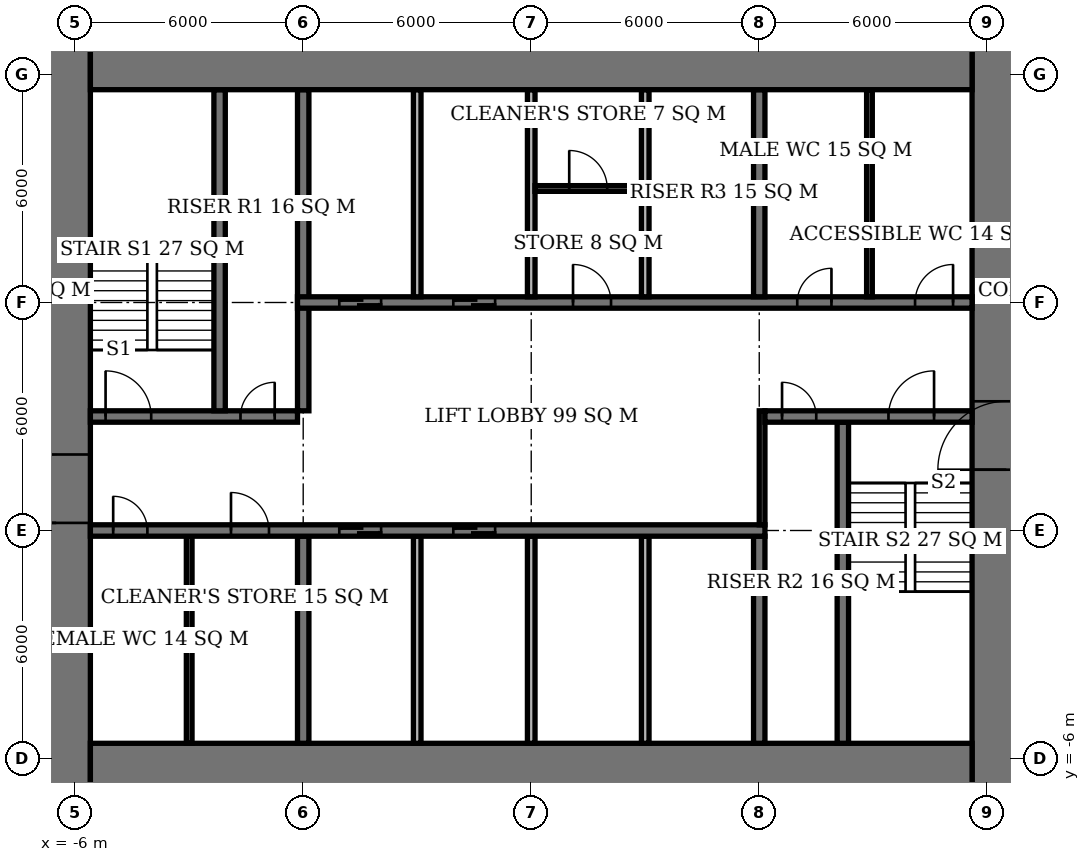
"""IFC4 building model, lengths in metres.
Left out: names, types, materials, properties, quantities, classifications, styles, units other than length and angle.
Written with IfcOpenShell. Run it as: python <this file> out.ifc"""

import sys

from ifc_helpers import new_model, si_unit, direction, frame, frame_2d, origin, place, context, subcontext, project, spatial, rectangle, extrude, element, fill, save


model = new_model("IFC4")
c1 = context("Model", 3, precision=1e-05, world=origin(), true_north=direction((0.0, 1.0)))
c2 = subcontext(c1, "Body", "Model", "MODEL_VIEW")
j1 = project(units=[si_unit("LENGTHUNIT", "METRE"), si_unit("PLANEANGLEUNIT", "RADIAN")], contexts=[c1])
p1 = place(None, origin())
s1 = spatial("IfcSite", under=j1, at=p1, CompositionType="ELEMENT")
p2 = place(p1, origin())
s2 = spatial("IfcBuilding", under=s1, at=p2, CompositionType="ELEMENT")
p3 = place(p2, frame((0.0, 0.0, 132.8)))
s3 = spatial("IfcBuildingStorey", under=s2, at=p3, CompositionType="ELEMENT", Elevation=132.8)
for number, where, z_axis, x_axis in (
    (1, (-5.6, -6.6, 0.0), (0.0, 0.0, 1.0), (1.0, 0.0, 0.0)),
    (2, (-5.6, 12.6, 0.0), (0.0, 0.0, 1.0), (1.0, 0.0, 0.0)),
):
    element("IfcWall", number, at=place(p3, frame(where, z_axis=z_axis, x_axis=x_axis)), inside=s3, PredefinedType="SHEAR", context=c2, shape_type="SweptSolid", body=[
        extrude(rectangle(XDim=23.2, YDim=2.0, at=frame_2d((11.6, 0.0))), origin(), (0.0, 0.0, 1.0), 3.9),
    ])
p4 = place(p3, frame((-6.5, -7.6, 0.0), z_axis=(0.0, 0.0, 1.0), x_axis=(0.0, 1.0, 0.0)))
e3 = element("IfcWall", 3, at=p4, inside=s3, PredefinedType="SHEAR", context=c2, shape_type="SweptSolid", body=[
    extrude(rectangle(XDim=21.2, YDim=1.8, at=frame_2d((10.6, 0.0))), origin(), (0.0, 0.0, 1.0), 3.9),
])
p5 = place(p4, frame((7.8, 0.0, 0.0)))
e4 = element("IfcOpeningElement", 4, at=p5, cuts=e3, PredefinedType="OPENING", context=c2, shape_type="SweptSolid", body=[
    extrude(rectangle(XDim=1.8, YDim=2.4, at=frame_2d((0.9, 1.2))), frame((0.0, 0.91, 0.0), z_axis=(0.0, -1.0, 0.0), x_axis=(1.0, 0.0, 0.0)), (0.0, 0.0, 1.0), 1.82),
])
p6 = place(p3, frame((18.5, -7.6, 0.0), z_axis=(0.0, 0.0, 1.0), x_axis=(0.0, 1.0, 0.0)))
e5 = element("IfcWall", 5, at=p6, inside=s3, PredefinedType="SHEAR", context=c2, shape_type="SweptSolid", body=[
    extrude(rectangle(XDim=21.2, YDim=1.8, at=frame_2d((10.6, 0.0))), origin(), (0.0, 0.0, 1.0), 3.9),
])
p7 = place(p6, frame((9.2, 0.0, 0.0)))
e6 = element("IfcOpeningElement", 6, at=p7, cuts=e5, PredefinedType="OPENING", context=c2, shape_type="SweptSolid", body=[
    extrude(rectangle(XDim=1.8, YDim=2.4, at=frame_2d((0.9, 1.2))), frame((0.0, 0.91, 0.0), z_axis=(0.0, -1.0, 0.0), x_axis=(1.0, 0.0, 0.0)), (0.0, 0.0, 1.0), 1.82),
])
p8 = place(p3, frame((-5.6, 0.0, 0.0), z_axis=(0.0, 0.0, 1.0), x_axis=(1.0, 0.0, 0.0)))
e7 = element("IfcWall", 7, at=p8, inside=s3, PredefinedType="SHEAR", context=c2, shape_type="SweptSolid", body=[
    extrude(rectangle(XDim=17.75, YDim=0.3, at=frame_2d((8.875, 0.0))), origin(), (0.0, 0.0, 1.0), 3.9),
])
p9 = place(p8, frame((0.6, 0.0, 0.0)))
e8 = element("IfcOpeningElement", 8, at=p9, cuts=e7, PredefinedType="OPENING", context=c2, shape_type="SweptSolid", body=[
    extrude(rectangle(XDim=0.9, YDim=2.1, at=frame_2d((0.45, 1.05))), frame((0.0, 0.16, 0.0), z_axis=(0.0, -1.0, 0.0), x_axis=(1.0, 0.0, 0.0)), (0.0, 0.0, 1.0), 0.32),
])
p10 = place(p8, frame((3.7, 0.0, 0.0)))
e9 = element("IfcOpeningElement", 9, at=p10, cuts=e7, PredefinedType="OPENING", context=c2, shape_type="SweptSolid", body=[
    extrude(rectangle(XDim=1.0, YDim=2.1, at=frame_2d((0.5, 1.05))), frame((0.0, 0.16, 0.0), z_axis=(0.0, -1.0, 0.0), x_axis=(1.0, 0.0, 0.0)), (0.0, 0.0, 1.0), 0.32),
])
p11 = place(p8, frame((6.55, 0.0, 0.0)))
e10 = element("IfcOpeningElement", 10, at=p11, cuts=e7, PredefinedType="OPENING", context=c2, shape_type="SweptSolid", body=[
    extrude(rectangle(XDim=1.1, YDim=2.1, at=frame_2d((0.55, 1.05))), frame((0.0, 0.16, 0.0), z_axis=(0.0, -1.0, 0.0), x_axis=(1.0, 0.0, 0.0)), (0.0, 0.0, 1.0), 0.32),
])
p12 = place(p8, frame((9.55, 0.0, 0.0)))
e11 = element("IfcOpeningElement", 11, at=p12, cuts=e7, PredefinedType="OPENING", context=c2, shape_type="SweptSolid", body=[
    extrude(rectangle(XDim=1.1, YDim=2.1, at=frame_2d((0.55, 1.05))), frame((0.0, 0.16, 0.0), z_axis=(0.0, -1.0, 0.0), x_axis=(1.0, 0.0, 0.0)), (0.0, 0.0, 1.0), 0.32),
])
p13 = place(p3, frame((-5.6, 3.0, 0.0), z_axis=(0.0, 0.0, 1.0), x_axis=(1.0, 0.0, 0.0)))
e12 = element("IfcWall", 12, at=p13, inside=s3, PredefinedType="SHEAR", context=c2, shape_type="SweptSolid", body=[
    extrude(rectangle(XDim=5.45, YDim=0.3, at=frame_2d((2.725, 0.0))), origin(), (0.0, 0.0, 1.0), 3.9),
])
p14 = place(p13, frame((0.4, 0.0, 0.0)))
e13 = element("IfcOpeningElement", 13, at=p14, cuts=e12, PredefinedType="OPENING", context=c2, shape_type="SweptSolid", body=[
    extrude(rectangle(XDim=1.2, YDim=2.1, at=frame_2d((0.6, 1.05))), frame((0.0, 0.16, 0.0), z_axis=(0.0, -1.0, 0.0), x_axis=(1.0, 0.0, 0.0)), (0.0, 0.0, 1.0), 0.32),
])
p15 = place(p13, frame((3.95, 0.0, 0.0)))
e14 = element("IfcOpeningElement", 14, at=p15, cuts=e12, PredefinedType="OPENING", context=c2, shape_type="SweptSolid", body=[
    extrude(rectangle(XDim=0.9, YDim=2.1, at=frame_2d((0.45, 1.05))), frame((0.0, 0.16, 0.0), z_axis=(0.0, -1.0, 0.0), x_axis=(1.0, 0.0, 0.0)), (0.0, 0.0, 1.0), 0.32),
])
p16 = place(p3, frame((12.15, 3.0, 0.0), z_axis=(0.0, 0.0, 1.0), x_axis=(1.0, 0.0, 0.0)))
e15 = element("IfcWall", 15, at=p16, inside=s3, PredefinedType="SHEAR", context=c2, shape_type="SweptSolid", body=[
    extrude(rectangle(XDim=5.45, YDim=0.3, at=frame_2d((2.725, 0.0))), origin(), (0.0, 0.0, 1.0), 3.9),
])
p17 = place(p16, frame((3.25, 0.0, 0.0)))
e16 = element("IfcOpeningElement", 16, at=p17, cuts=e15, PredefinedType="OPENING", context=c2, shape_type="SweptSolid", body=[
    extrude(rectangle(XDim=1.2, YDim=2.1, at=frame_2d((0.6, 1.05))), frame((0.0, 0.16, 0.0), z_axis=(0.0, -1.0, 0.0), x_axis=(1.0, 0.0, 0.0)), (0.0, 0.0, 1.0), 0.32),
])
p18 = place(p16, frame((0.45, 0.0, 0.0)))
e17 = element("IfcOpeningElement", 17, at=p18, cuts=e15, PredefinedType="OPENING", context=c2, shape_type="SweptSolid", body=[
    extrude(rectangle(XDim=0.9, YDim=2.1, at=frame_2d((0.45, 1.05))), frame((0.0, 0.16, 0.0), z_axis=(0.0, -1.0, 0.0), x_axis=(1.0, 0.0, 0.0)), (0.0, 0.0, 1.0), 0.32),
])
p19 = place(p3, frame((-0.15, 6.0, 0.0), z_axis=(0.0, 0.0, 1.0), x_axis=(1.0, 0.0, 0.0)))
e18 = element("IfcWall", 18, at=p19, inside=s3, PredefinedType="SHEAR", context=c2, shape_type="SweptSolid", body=[
    extrude(rectangle(XDim=17.75, YDim=0.3, at=frame_2d((8.875, 0.0))), origin(), (0.0, 0.0, 1.0), 3.9),
])
p20 = place(p19, frame((13.15, 0.0, 0.0)))
e19 = element("IfcOpeningElement", 19, at=p20, cuts=e18, PredefinedType="OPENING", context=c2, shape_type="SweptSolid", body=[
    extrude(rectangle(XDim=0.9, YDim=2.1, at=frame_2d((0.45, 1.05))), frame((0.0, 0.16, 0.0), z_axis=(0.0, -1.0, 0.0), x_axis=(1.0, 0.0, 0.0)), (0.0, 0.0, 1.0), 0.32),
])
p21 = place(p19, frame((16.25, 0.0, 0.0)))
e20 = element("IfcOpeningElement", 20, at=p21, cuts=e18, PredefinedType="OPENING", context=c2, shape_type="SweptSolid", body=[
    extrude(rectangle(XDim=1.0, YDim=2.1, at=frame_2d((0.5, 1.05))), frame((0.0, 0.16, 0.0), z_axis=(0.0, -1.0, 0.0), x_axis=(1.0, 0.0, 0.0)), (0.0, 0.0, 1.0), 0.32),
])
p22 = place(p19, frame((7.25, 0.0, 0.0)))
e21 = element("IfcOpeningElement", 21, at=p22, cuts=e18, PredefinedType="OPENING", context=c2, shape_type="SweptSolid", body=[
    extrude(rectangle(XDim=1.0, YDim=2.1, at=frame_2d((0.5, 1.05))), frame((0.0, 0.16, 0.0), z_axis=(0.0, -1.0, 0.0), x_axis=(1.0, 0.0, 0.0)), (0.0, 0.0, 1.0), 0.32),
])
p23 = place(p19, frame((1.1, 0.0, 0.0)))
e22 = element("IfcOpeningElement", 22, at=p23, cuts=e18, PredefinedType="OPENING", context=c2, shape_type="SweptSolid", body=[
    extrude(rectangle(XDim=1.1, YDim=2.1, at=frame_2d((0.55, 1.05))), frame((0.0, 0.16, 0.0), z_axis=(0.0, -1.0, 0.0), x_axis=(1.0, 0.0, 0.0)), (0.0, 0.0, 1.0), 0.32),
])
p24 = place(p19, frame((4.1, 0.0, 0.0)))
e23 = element("IfcOpeningElement", 23, at=p24, cuts=e18, PredefinedType="OPENING", context=c2, shape_type="SweptSolid", body=[
    extrude(rectangle(XDim=1.1, YDim=2.1, at=frame_2d((0.55, 1.05))), frame((0.0, 0.16, 0.0), z_axis=(0.0, -1.0, 0.0), x_axis=(1.0, 0.0, 0.0)), (0.0, 0.0, 1.0), 0.32),
])
p25 = place(p3, frame((0.0, -5.6, 0.0), z_axis=(0.0, 0.0, 1.0), x_axis=(0.0, 1.0, 0.0)))
e24 = element("IfcWall", 24, at=p25, inside=s3, PredefinedType="SHEAR", context=c2, shape_type="SweptSolid", body=[
    extrude(rectangle(XDim=5.45, YDim=0.3, at=frame_2d((2.725, 0.0))), origin(), (0.0, 0.0, 1.0), 3.9),
])
p26 = place(p3, frame((0.0, 3.15, 0.0), z_axis=(0.0, 0.0, 1.0), x_axis=(0.0, 1.0, 0.0)))
e25 = element("IfcWall", 25, at=p26, inside=s3, PredefinedType="SHEAR", context=c2, shape_type="SweptSolid", body=[
    extrude(rectangle(XDim=8.45, YDim=0.3, at=frame_2d((4.225, 0.0))), origin(), (0.0, 0.0, 1.0), 3.9),
])
for number, where, z_axis, x_axis in (
    (26, (12.0, -5.6, 0.0), (0.0, 0.0, 1.0), (0.0, 1.0, 0.0)),
    (27, (12.0, 6.15, 0.0), (0.0, 0.0, 1.0), (0.0, 1.0, 0.0)),
):
    element("IfcWall", number, at=place(p3, frame(where, z_axis=z_axis, x_axis=x_axis)), inside=s3, PredefinedType="SHEAR", context=c2, shape_type="SweptSolid", body=[
        extrude(rectangle(XDim=5.45, YDim=0.3, at=frame_2d((2.725, 0.0))), origin(), (0.0, 0.0, 1.0), 3.9),
    ])
for number, where, z_axis, x_axis in (
    (28, (-2.2, 3.15, 0.0), (0.0, 0.0, 1.0), (0.0, 1.0, 0.0)),
    (29, (14.2, -5.6, 0.0), (0.0, 0.0, 1.0), (0.0, 1.0, 0.0)),
):
    element("IfcWall", number, at=place(p3, frame(where, z_axis=z_axis, x_axis=x_axis)), inside=s3, PredefinedType="SHEAR", context=c2, shape_type="SweptSolid", body=[
        extrude(rectangle(XDim=8.45, YDim=0.3, at=frame_2d((4.225, 0.0))), origin(), (0.0, 0.0, 1.0), 3.9),
    ])
for number, where, z_axis, x_axis in (
    (30, (3.0, 6.15, 0.0), (0.0, 0.0, 1.0), (0.0, 1.0, 0.0)),
    (31, (6.0, 6.15, 0.0), (0.0, 0.0, 1.0), (0.0, 1.0, 0.0)),
    (32, (9.0, 6.15, 0.0), (0.0, 0.0, 1.0), (0.0, 1.0, 0.0)),
    (33, (3.0, -5.6, 0.0), (0.0, 0.0, 1.0), (0.0, 1.0, 0.0)),
    (34, (6.0, -5.6, 0.0), (0.0, 0.0, 1.0), (0.0, 1.0, 0.0)),
    (35, (9.0, -5.6, 0.0), (0.0, 0.0, 1.0), (0.0, 1.0, 0.0)),
):
    element("IfcWall", number, at=place(p3, frame(where, z_axis=z_axis, x_axis=x_axis)), inside=s3, PredefinedType="SOLIDWALL", context=c2, shape_type="SweptSolid", body=[
        extrude(rectangle(XDim=5.45, YDim=0.2, at=frame_2d((2.725, 0.0))), origin(), (0.0, 0.0, 1.0), 3.9),
    ])
for number, where, z_axis, x_axis in (
    (36, (-3.0, -5.6, 0.0), (0.0, 0.0, 1.0), (0.0, 1.0, 0.0)),
    (37, (14.9, 6.15, 0.0), (0.0, 0.0, 1.0), (0.0, 1.0, 0.0)),
):
    element("IfcWall", number, at=place(p3, frame(where, z_axis=z_axis, x_axis=x_axis)), inside=s3, PredefinedType="PLUMBINGWALL", context=c2, shape_type="SweptSolid", body=[
        extrude(rectangle(XDim=5.45, YDim=0.15, at=frame_2d((2.725, 0.0))), origin(), (0.0, 0.0, 1.0), 3.65),
    ])
p27 = place(p3, frame((6.1, 9.0, 0.0), z_axis=(0.0, 0.0, 1.0), x_axis=(1.0, 0.0, 0.0)))
e38 = element("IfcWall", 38, at=p27, inside=s3, PredefinedType="PARTITIONING", context=c2, shape_type="SweptSolid", body=[
    extrude(rectangle(XDim=2.8, YDim=0.15, at=frame_2d((1.4, 0.0))), origin(), (0.0, 0.0, 1.0), 3.65),
])
p28 = place(p27, frame((0.9, 0.0, 0.0)))
e39 = element("IfcOpeningElement", 39, at=p28, cuts=e38, PredefinedType="OPENING", context=c2, shape_type="SweptSolid", body=[
    extrude(rectangle(XDim=1.0, YDim=2.1, at=frame_2d((0.5, 1.05))), frame((0.0, 0.085, 0.0), z_axis=(0.0, -1.0, 0.0), x_axis=(1.0, 0.0, 0.0)), (0.0, 0.0, 1.0), 0.17),
])
p29 = place(p3, frame((12.075, 0.15, 0.0), z_axis=(0.0, 0.0, 1.0), x_axis=(0.0, 1.0, 0.0)))
e40 = element("IfcWall", 40, at=p29, inside=s3, PredefinedType="PARTITIONING", context=c2, shape_type="SweptSolid", body=[
    extrude(rectangle(XDim=3.0, YDim=0.15, at=frame_2d((1.5, 0.0))), origin(), (0.0, 0.0, 1.0), 3.65),
])
p30 = place(p5, origin())
e41 = element("IfcDoor", 41, at=p30, inside=s3, OperationType="DOUBLE_DOOR_SINGLE_SWING", PredefinedType="DOOR", context=c2, shape_type="SweptSolid", body=[
    extrude(rectangle(XDim=1.8, YDim=2.4, at=frame_2d((0.9, 1.2))), frame((0.0, 0.025, 0.0), z_axis=(0.0, -1.0, 0.0), x_axis=(1.0, 0.0, 0.0)), (0.0, 0.0, 1.0), 0.05),
])
fill(e4, e41)
p31 = place(p7, origin())
e42 = element("IfcDoor", 42, at=p31, inside=s3, OperationType="DOUBLE_DOOR_SINGLE_SWING", PredefinedType="DOOR", context=c2, shape_type="SweptSolid", body=[
    extrude(rectangle(XDim=1.8, YDim=2.4, at=frame_2d((0.9, 1.2))), frame((0.0, 0.025, 0.0), z_axis=(0.0, -1.0, 0.0), x_axis=(1.0, 0.0, 0.0)), (0.0, 0.0, 1.0), 0.05),
])
fill(e6, e42)
p32 = place(p14, origin())
e43 = element("IfcDoor", 43, at=p32, inside=s3, OperationType="SINGLE_SWING_LEFT", PredefinedType="DOOR", context=c2, shape_type="SweptSolid", body=[
    extrude(rectangle(XDim=1.2, YDim=2.1, at=frame_2d((0.6, 1.05))), frame((0.0, 0.025, 0.0), z_axis=(0.0, -1.0, 0.0), x_axis=(1.0, 0.0, 0.0)), (0.0, 0.0, 1.0), 0.05),
])
fill(e13, e43)
p33 = place(p15, origin())
e44 = element("IfcDoor", 44, at=p33, inside=s3, OperationType="SINGLE_SWING_RIGHT", PredefinedType="DOOR", context=c2, shape_type="SweptSolid", body=[
    extrude(rectangle(XDim=0.9, YDim=2.1, at=frame_2d((0.45, 1.05))), frame((0.0, 0.025, 0.0), z_axis=(0.0, -1.0, 0.0), x_axis=(1.0, 0.0, 0.0)), (0.0, 0.0, 1.0), 0.05),
])
fill(e14, e44)
p34 = place(p17, origin())
e45 = element("IfcDoor", 45, at=p34, inside=s3, OperationType="SINGLE_SWING_RIGHT", PredefinedType="DOOR", context=c2, shape_type="SweptSolid", body=[
    extrude(rectangle(XDim=1.2, YDim=2.1, at=frame_2d((0.6, 1.05))), frame((0.0, 0.025, 0.0), z_axis=(0.0, -1.0, 0.0), x_axis=(1.0, 0.0, 0.0)), (0.0, 0.0, 1.0), 0.05),
])
fill(e16, e45)
p35 = place(p18, origin())
e46 = element("IfcDoor", 46, at=p35, inside=s3, OperationType="SINGLE_SWING_LEFT", PredefinedType="DOOR", context=c2, shape_type="SweptSolid", body=[
    extrude(rectangle(XDim=0.9, YDim=2.1, at=frame_2d((0.45, 1.05))), frame((0.0, 0.025, 0.0), z_axis=(0.0, -1.0, 0.0), x_axis=(1.0, 0.0, 0.0)), (0.0, 0.0, 1.0), 0.05),
])
fill(e17, e46)
p36 = place(p9, origin())
e47 = element("IfcDoor", 47, at=p36, inside=s3, OperationType="SINGLE_SWING_LEFT", PredefinedType="DOOR", context=c2, shape_type="SweptSolid", body=[
    extrude(rectangle(XDim=0.9, YDim=2.1, at=frame_2d((0.45, 1.05))), frame((0.0, 0.025, 0.0), z_axis=(0.0, -1.0, 0.0), x_axis=(1.0, 0.0, 0.0)), (0.0, 0.0, 1.0), 0.05),
])
fill(e8, e47)
p37 = place(p10, origin())
e48 = element("IfcDoor", 48, at=p37, inside=s3, OperationType="SINGLE_SWING_LEFT", PredefinedType="DOOR", context=c2, shape_type="SweptSolid", body=[
    extrude(rectangle(XDim=1.0, YDim=2.1, at=frame_2d((0.5, 1.05))), frame((0.0, 0.025, 0.0), z_axis=(0.0, -1.0, 0.0), x_axis=(1.0, 0.0, 0.0)), (0.0, 0.0, 1.0), 0.05),
])
fill(e9, e48)
p38 = place(p20, origin())
e49 = element("IfcDoor", 49, at=p38, inside=s3, OperationType="SINGLE_SWING_RIGHT", PredefinedType="DOOR", context=c2, shape_type="SweptSolid", body=[
    extrude(rectangle(XDim=0.9, YDim=2.1, at=frame_2d((0.45, 1.05))), frame((0.0, 0.025, 0.0), z_axis=(0.0, -1.0, 0.0), x_axis=(1.0, 0.0, 0.0)), (0.0, 0.0, 1.0), 0.05),
])
fill(e19, e49)
p39 = place(p21, origin())
e50 = element("IfcDoor", 50, at=p39, inside=s3, OperationType="SINGLE_SWING_RIGHT", PredefinedType="DOOR", context=c2, shape_type="SweptSolid", body=[
    extrude(rectangle(XDim=1.0, YDim=2.1, at=frame_2d((0.5, 1.05))), frame((0.0, 0.025, 0.0), z_axis=(0.0, -1.0, 0.0), x_axis=(1.0, 0.0, 0.0)), (0.0, 0.0, 1.0), 0.05),
])
fill(e20, e50)
p40 = place(p28, origin())
e51 = element("IfcDoor", 51, at=p40, inside=s3, OperationType="SINGLE_SWING_LEFT", PredefinedType="DOOR", context=c2, shape_type="SweptSolid", body=[
    extrude(rectangle(XDim=1.0, YDim=2.1, at=frame_2d((0.5, 1.05))), frame((0.0, 0.025, 0.0), z_axis=(0.0, -1.0, 0.0), x_axis=(1.0, 0.0, 0.0)), (0.0, 0.0, 1.0), 0.05),
])
fill(e39, e51)
p41 = place(p22, origin())
e52 = element("IfcDoor", 52, at=p41, inside=s3, OperationType="SINGLE_SWING_LEFT", PredefinedType="DOOR", context=c2, shape_type="SweptSolid", body=[
    extrude(rectangle(XDim=1.0, YDim=2.1, at=frame_2d((0.5, 1.05))), frame((0.0, 0.025, 0.0), z_axis=(0.0, -1.0, 0.0), x_axis=(1.0, 0.0, 0.0)), (0.0, 0.0, 1.0), 0.05),
])
fill(e21, e52)
p42 = place(p23, origin())
e53 = element("IfcDoor", 53, at=p42, inside=s3, OperationType="DOUBLE_DOOR_SLIDING", PredefinedType="USERDEFINED", context=c2, shape_type="SweptSolid", body=[
    extrude(rectangle(XDim=1.1, YDim=2.1, at=frame_2d((0.55, 1.05))), frame((0.0, 0.025, 0.0), z_axis=(0.0, -1.0, 0.0), x_axis=(1.0, 0.0, 0.0)), (0.0, 0.0, 1.0), 0.05),
])
fill(e22, e53)
p43 = place(p24, origin())
e54 = element("IfcDoor", 54, at=p43, inside=s3, OperationType="DOUBLE_DOOR_SLIDING", PredefinedType="USERDEFINED", context=c2, shape_type="SweptSolid", body=[
    extrude(rectangle(XDim=1.1, YDim=2.1, at=frame_2d((0.55, 1.05))), frame((0.0, 0.025, 0.0), z_axis=(0.0, -1.0, 0.0), x_axis=(1.0, 0.0, 0.0)), (0.0, 0.0, 1.0), 0.05),
])
fill(e23, e54)
p44 = place(p11, origin())
e55 = element("IfcDoor", 55, at=p44, inside=s3, OperationType="DOUBLE_DOOR_SLIDING", PredefinedType="USERDEFINED", context=c2, shape_type="SweptSolid", body=[
    extrude(rectangle(XDim=1.1, YDim=2.1, at=frame_2d((0.55, 1.05))), frame((0.0, 0.025, 0.0), z_axis=(0.0, -1.0, 0.0), x_axis=(1.0, 0.0, 0.0)), (0.0, 0.0, 1.0), 0.05),
])
fill(e10, e55)
p45 = place(p12, origin())
e56 = element("IfcDoor", 56, at=p45, inside=s3, OperationType="DOUBLE_DOOR_SLIDING", PredefinedType="USERDEFINED", context=c2, shape_type="SweptSolid", body=[
    extrude(rectangle(XDim=1.1, YDim=2.1, at=frame_2d((0.55, 1.05))), frame((0.0, 0.025, 0.0), z_axis=(0.0, -1.0, 0.0), x_axis=(1.0, 0.0, 0.0)), (0.0, 0.0, 1.0), 0.05),
])
fill(e11, e56)
save(model, sys.argv[1])
